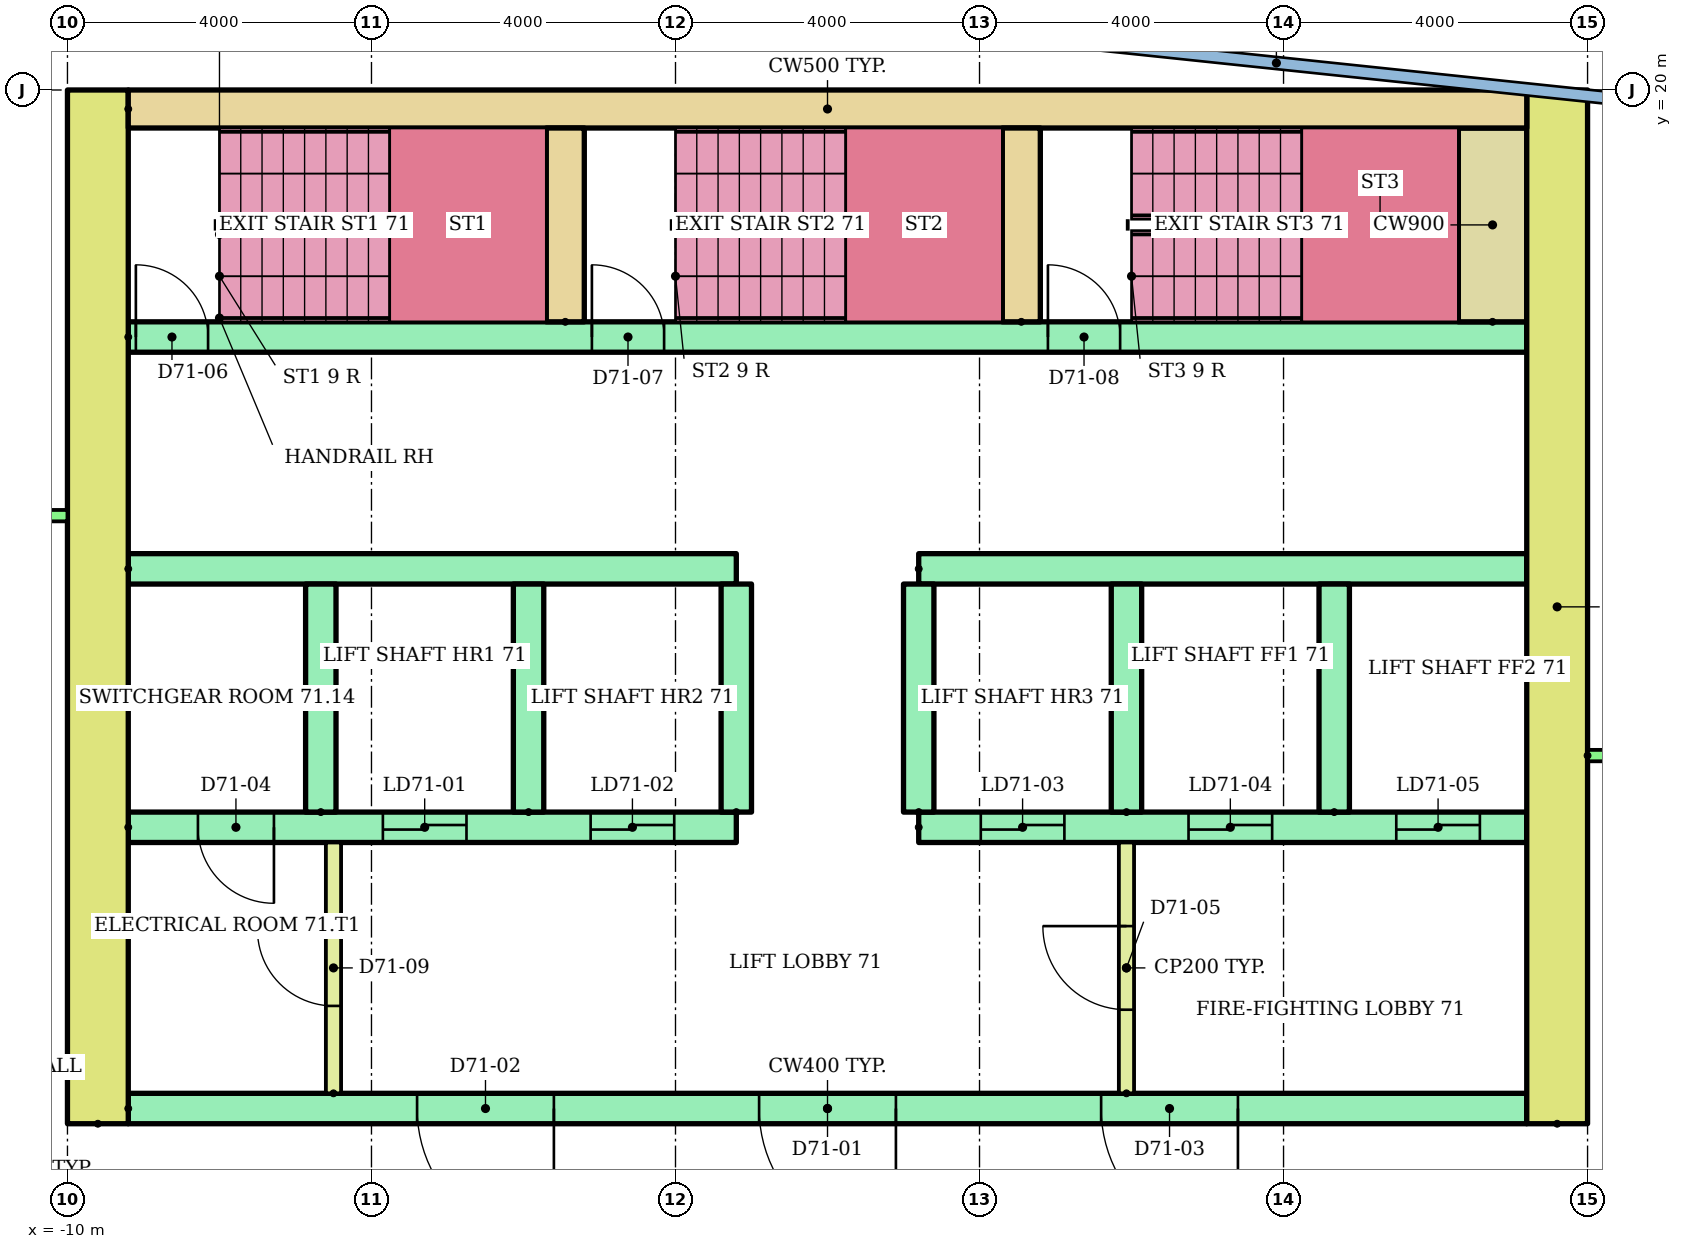
"""IFC4 building model, lengths in metres.
Left out: names, types, materials, properties, quantities, classifications, styles, units other than length and angle.
Written with IfcOpenShell. Run it as: python <this file> out.ifc"""

import sys

from ifc_helpers import new_model, si_unit, direction, frame, frame_2d, origin, place, context, subcontext, project, spatial, rectangle, extrude, element, fill, save


model = new_model("IFC4")
c1 = context("Model", 3, precision=1e-05, world=origin(), true_north=direction((0.0, 1.0)))
c2 = subcontext(c1, "Body", "Model", "MODEL_VIEW")
j1 = project(units=[si_unit("LENGTHUNIT", "METRE"), si_unit("PLANEANGLEUNIT", "RADIAN")], contexts=[c1])
p1 = place(None, origin())
s1 = spatial("IfcSite", under=j1, at=p1, CompositionType="ELEMENT")
p2 = place(p1, origin())
s2 = spatial("IfcBuilding", under=s1, at=p2, CompositionType="ELEMENT")
p3 = place(p2, frame((0.0, 0.0, 272.3)))
s3 = spatial("IfcBuildingStorey", under=s2, at=p3, CompositionType="ELEMENT", Elevation=272.3)
for number, where, z_axis, x_axis in (
    (1, (-9.6, 6.4, 0.0), (0.0, 0.0, 1.0), (0.0, 1.0, 0.0)),
    (2, (9.6, 6.4, 0.0), (0.0, 0.0, 1.0), (0.0, 1.0, 0.0)),
):
    element("IfcWall", number, at=place(p3, frame(where, z_axis=z_axis, x_axis=x_axis)), inside=s3, PredefinedType="SHEAR", context=c2, shape_type="SweptSolid", body=[
        extrude(rectangle(XDim=13.6, YDim=0.8, at=frame_2d((6.8, 0.0))), origin(), (0.0, 0.0, 1.0), 2.92),
    ])
p4 = place(p3, frame((-9.2, 19.75, 0.0)))
e3 = element("IfcWall", 3, at=p4, inside=s3, PredefinedType="SHEAR", context=c2, shape_type="SweptSolid", body=[
    extrude(rectangle(XDim=18.4, YDim=0.5, at=frame_2d((9.2, 0.0))), origin(), (0.0, 0.0, 1.0), 2.92),
])
p5 = place(p3, frame((-9.2, 6.6, 0.0)))
e4 = element("IfcWall", 4, at=p5, inside=s3, PredefinedType="SHEAR", context=c2, shape_type="SweptSolid", body=[
    extrude(rectangle(XDim=18.4, YDim=0.4, at=frame_2d((9.2, 0.0))), origin(), (0.0, 0.0, 1.0), 2.92),
])
p6 = place(p5, frame((8.3, 0.0, 0.0)))
e5 = element("IfcOpeningElement", 5, at=p6, cuts=e4, PredefinedType="OPENING", context=c2, shape_type="SweptSolid", body=[
    extrude(rectangle(XDim=1.8, YDim=2.1, at=frame_2d((0.9, 1.05))), frame((0.0, 0.21, 0.0), z_axis=(0.0, -1.0, 0.0), x_axis=(1.0, 0.0, 0.0)), (0.0, 0.0, 1.0), 0.42),
])
p7 = place(p5, frame((3.8, 0.0, 0.0)))
e6 = element("IfcOpeningElement", 6, at=p7, cuts=e4, PredefinedType="OPENING", context=c2, shape_type="SweptSolid", body=[
    extrude(rectangle(XDim=1.8, YDim=2.1, at=frame_2d((0.9, 1.05))), frame((0.0, 0.21, 0.0), z_axis=(0.0, -1.0, 0.0), x_axis=(1.0, 0.0, 0.0)), (0.0, 0.0, 1.0), 0.42),
])
p8 = place(p5, frame((12.8, 0.0, 0.0)))
e7 = element("IfcOpeningElement", 7, at=p8, cuts=e4, PredefinedType="OPENING", context=c2, shape_type="SweptSolid", body=[
    extrude(rectangle(XDim=1.8, YDim=2.1, at=frame_2d((0.9, 1.05))), frame((0.0, 0.21, 0.0), z_axis=(0.0, -1.0, 0.0), x_axis=(1.0, 0.0, 0.0)), (0.0, 0.0, 1.0), 0.42),
])
p9 = place(p3, frame((-9.2, 10.3, 0.0)))
e8 = element("IfcWall", 8, at=p9, inside=s3, PredefinedType="SHEAR", context=c2, shape_type="SweptSolid", body=[
    extrude(rectangle(XDim=8.0, YDim=0.4, at=frame_2d((4.0, 0.0))), origin(), (0.0, 0.0, 1.0), 2.92),
])
p10 = place(p9, frame((3.35, 0.0, 0.0)))
e9 = element("IfcOpeningElement", 9, at=p10, cuts=e8, PredefinedType="OPENING", context=c2, shape_type="SweptSolid", body=[
    extrude(rectangle(XDim=1.1, YDim=2.1, at=frame_2d((0.55, 1.05))), frame((0.0, 0.21, 0.0), z_axis=(0.0, -1.0, 0.0), x_axis=(1.0, 0.0, 0.0)), (0.0, 0.0, 1.0), 0.42),
])
p11 = place(p9, frame((6.083, 0.0, 0.0)))
e10 = element("IfcOpeningElement", 10, at=p11, cuts=e8, PredefinedType="OPENING", context=c2, shape_type="SweptSolid", body=[
    extrude(rectangle(XDim=1.1, YDim=2.1, at=frame_2d((0.55, 1.05))), frame((0.0, 0.21, 0.0), z_axis=(0.0, -1.0, 0.0), x_axis=(1.0, 0.0, 0.0)), (0.0, 0.0, 1.0), 0.42),
])
p12 = place(p9, frame((0.917, 0.0, 0.0)))
e11 = element("IfcOpeningElement", 11, at=p12, cuts=e8, PredefinedType="OPENING", context=c2, shape_type="SweptSolid", body=[
    extrude(rectangle(XDim=1.0, YDim=2.1, at=frame_2d((0.5, 1.05))), frame((0.0, 0.21, 0.0), z_axis=(0.0, -1.0, 0.0), x_axis=(1.0, 0.0, 0.0)), (0.0, 0.0, 1.0), 0.42),
])
p13 = place(p3, frame((-9.2, 13.7, 0.0)))
e12 = element("IfcWall", 12, at=p13, inside=s3, PredefinedType="SHEAR", context=c2, shape_type="SweptSolid", body=[
    extrude(rectangle(XDim=8.0, YDim=0.4, at=frame_2d((4.0, 0.0))), origin(), (0.0, 0.0, 1.0), 2.92),
])
p14 = place(p3, frame((1.2, 10.3, 0.0)))
e13 = element("IfcWall", 13, at=p14, inside=s3, PredefinedType="SHEAR", context=c2, shape_type="SweptSolid", body=[
    extrude(rectangle(XDim=8.0, YDim=0.4, at=frame_2d((4.0, 0.0))), origin(), (0.0, 0.0, 1.0), 2.92),
])
p15 = place(p14, frame((0.817, 0.0, 0.0)))
e14 = element("IfcOpeningElement", 14, at=p15, cuts=e13, PredefinedType="OPENING", context=c2, shape_type="SweptSolid", body=[
    extrude(rectangle(XDim=1.1, YDim=2.1, at=frame_2d((0.55, 1.05))), frame((0.0, 0.21, 0.0), z_axis=(0.0, -1.0, 0.0), x_axis=(1.0, 0.0, 0.0)), (0.0, 0.0, 1.0), 0.42),
])
p16 = place(p14, frame((3.55, 0.0, 0.0)))
e15 = element("IfcOpeningElement", 15, at=p16, cuts=e13, PredefinedType="OPENING", context=c2, shape_type="SweptSolid", body=[
    extrude(rectangle(XDim=1.1, YDim=2.1, at=frame_2d((0.55, 1.05))), frame((0.0, 0.21, 0.0), z_axis=(0.0, -1.0, 0.0), x_axis=(1.0, 0.0, 0.0)), (0.0, 0.0, 1.0), 0.42),
])
p17 = place(p14, frame((6.283, 0.0, 0.0)))
e16 = element("IfcOpeningElement", 16, at=p17, cuts=e13, PredefinedType="OPENING", context=c2, shape_type="SweptSolid", body=[
    extrude(rectangle(XDim=1.1, YDim=2.1, at=frame_2d((0.55, 1.05))), frame((0.0, 0.21, 0.0), z_axis=(0.0, -1.0, 0.0), x_axis=(1.0, 0.0, 0.0)), (0.0, 0.0, 1.0), 0.42),
])
p18 = place(p3, frame((1.2, 13.7, 0.0)))
e17 = element("IfcWall", 17, at=p18, inside=s3, PredefinedType="SHEAR", context=c2, shape_type="SweptSolid", body=[
    extrude(rectangle(XDim=8.0, YDim=0.4, at=frame_2d((4.0, 0.0))), origin(), (0.0, 0.0, 1.0), 2.92),
])
for number, where, z_axis, x_axis in (
    (18, (-6.667, 10.5, 0.0), (0.0, 0.0, 1.0), (0.0, 1.0, 0.0)),
    (19, (-3.933, 10.5, 0.0), (0.0, 0.0, 1.0), (0.0, 1.0, 0.0)),
    (20, (-1.2, 10.5, 0.0), (0.0, 0.0, 1.0), (0.0, 1.0, 0.0)),
    (21, (1.2, 10.5, 0.0), (0.0, 0.0, 1.0), (0.0, 1.0, 0.0)),
    (22, (3.933, 10.5, 0.0), (0.0, 0.0, 1.0), (0.0, 1.0, 0.0)),
    (23, (6.667, 10.5, 0.0), (0.0, 0.0, 1.0), (0.0, 1.0, 0.0)),
):
    element("IfcWall", number, at=place(p3, frame(where, z_axis=z_axis, x_axis=x_axis)), inside=s3, PredefinedType="SHEAR", context=c2, shape_type="SweptSolid", body=[
        extrude(rectangle(XDim=3.0, YDim=0.4, at=frame_2d((1.5, 0.0))), origin(), (0.0, 0.0, 1.0), 2.92),
    ])
p19 = place(p3, frame((3.933, 6.8, 0.0), z_axis=(0.0, 0.0, 1.0), x_axis=(0.0, 1.0, 0.0)))
e24 = element("IfcWall", 24, at=p19, inside=s3, PredefinedType="PARTITIONING", context=c2, shape_type="SweptSolid", body=[
    extrude(rectangle(XDim=3.3, YDim=0.2, at=frame_2d((1.65, 0.0))), origin(), (0.0, 0.0, 1.0), 2.92),
])
p20 = place(p19, frame((1.1, 0.0, 0.0)))
e25 = element("IfcOpeningElement", 25, at=p20, cuts=e24, PredefinedType="OPENING", context=c2, shape_type="SweptSolid", body=[
    extrude(rectangle(XDim=1.1, YDim=2.1, at=frame_2d((0.55, 1.05))), frame((0.0, 0.11, 0.0), z_axis=(0.0, -1.0, 0.0), x_axis=(1.0, 0.0, 0.0)), (0.0, 0.0, 1.0), 0.22),
])
p21 = place(p3, frame((-9.2, 16.75, 0.0)))
e26 = element("IfcWall", 26, at=p21, inside=s3, PredefinedType="SHEAR", context=c2, shape_type="SweptSolid", body=[
    extrude(rectangle(XDim=18.4, YDim=0.4, at=frame_2d((9.2, 0.0))), origin(), (0.0, 0.0, 1.0), 2.92),
])
p22 = place(p21, frame((0.1, 0.0, 0.0)))
e27 = element("IfcOpeningElement", 27, at=p22, cuts=e26, PredefinedType="OPENING", context=c2, shape_type="SweptSolid", body=[
    extrude(rectangle(XDim=0.95, YDim=2.1, at=frame_2d((0.475, 1.05))), frame((0.0, 0.21, 0.0), z_axis=(0.0, -1.0, 0.0), x_axis=(1.0, 0.0, 0.0)), (0.0, 0.0, 1.0), 0.42),
])
p23 = place(p21, frame((6.1, 0.0, 0.0)))
e28 = element("IfcOpeningElement", 28, at=p23, cuts=e26, PredefinedType="OPENING", context=c2, shape_type="SweptSolid", body=[
    extrude(rectangle(XDim=0.95, YDim=2.1, at=frame_2d((0.475, 1.05))), frame((0.0, 0.21, 0.0), z_axis=(0.0, -1.0, 0.0), x_axis=(1.0, 0.0, 0.0)), (0.0, 0.0, 1.0), 0.42),
])
p24 = place(p21, frame((12.1, 0.0, 0.0)))
e29 = element("IfcOpeningElement", 29, at=p24, cuts=e26, PredefinedType="OPENING", context=c2, shape_type="SweptSolid", body=[
    extrude(rectangle(XDim=0.95, YDim=2.1, at=frame_2d((0.475, 1.05))), frame((0.0, 0.21, 0.0), z_axis=(0.0, -1.0, 0.0), x_axis=(1.0, 0.0, 0.0)), (0.0, 0.0, 1.0), 0.42),
])
for number, where, z_axis, x_axis in (
    (30, (-3.45, 16.95, 0.0), (0.0, 0.0, 1.0), (0.0, 1.0, 0.0)),
    (31, (2.55, 16.95, 0.0), (0.0, 0.0, 1.0), (0.0, 1.0, 0.0)),
):
    element("IfcWall", number, at=place(p3, frame(where, z_axis=z_axis, x_axis=x_axis)), inside=s3, PredefinedType="SHEAR", context=c2, shape_type="SweptSolid", body=[
        extrude(rectangle(XDim=2.55, YDim=0.5, at=frame_2d((1.275, 0.0))), origin(), (0.0, 0.0, 1.0), 2.92),
    ])
p25 = place(p3, frame((8.75, 16.95, 0.0), z_axis=(0.0, 0.0, 1.0), x_axis=(0.0, 1.0, 0.0)))
e32 = element("IfcWall", 32, at=p25, inside=s3, PredefinedType="SHEAR", context=c2, shape_type="SweptSolid", body=[
    extrude(rectangle(XDim=2.55, YDim=0.9, at=frame_2d((1.275, 0.0))), origin(), (0.0, 0.0, 1.0), 2.92),
])
p26 = place(p3, frame((-6.5, 6.8, 0.0), z_axis=(0.0, 0.0, 1.0), x_axis=(0.0, 1.0, 0.0)))
e33 = element("IfcWall", 33, at=p26, inside=s3, PredefinedType="PARTITIONING", context=c2, shape_type="SweptSolid", body=[
    extrude(rectangle(XDim=3.3, YDim=0.2, at=frame_2d((1.65, 0.0))), origin(), (0.0, 0.0, 1.0), 2.92),
])
p27 = place(p26, frame((1.15, 0.0, 0.0)))
e34 = element("IfcOpeningElement", 34, at=p27, cuts=e33, PredefinedType="OPENING", context=c2, shape_type="SweptSolid", body=[
    extrude(rectangle(XDim=1.0, YDim=2.1, at=frame_2d((0.5, 1.05))), frame((0.0, 0.11, 0.0), z_axis=(0.0, -1.0, 0.0), x_axis=(1.0, 0.0, 0.0)), (0.0, 0.0, 1.0), 0.22),
])
p28 = place(p3, frame((-21.89, 14.4, 0.0)))
e35 = element("IfcWall", 35, at=p28, inside=s3, PredefinedType="PARTITIONING", context=c2, shape_type="SweptSolid", body=[
    extrude(rectangle(XDim=11.89, YDim=0.15, at=frame_2d((5.945, 0.0))), origin(), (0.0, 0.0, 1.0), 2.4),
])
p29 = place(p28, frame((1.26, 0.0, 0.0)))
e36 = element("IfcOpeningElement", 36, at=p29, cuts=e35, PredefinedType="OPENING", context=c2, shape_type="SweptSolid", body=[
    extrude(rectangle(XDim=1.0, YDim=2.1, at=frame_2d((0.5, 1.05))), frame((0.0, 0.085, 0.0), z_axis=(0.0, -1.0, 0.0), x_axis=(1.0, 0.0, 0.0)), (0.0, 0.0, 1.0), 0.17),
])
p30 = place(p28, frame((8.254, 0.0, 0.0)))
e37 = element("IfcOpeningElement", 37, at=p30, cuts=e35, PredefinedType="OPENING", context=c2, shape_type="SweptSolid", body=[
    extrude(rectangle(XDim=1.0, YDim=2.1, at=frame_2d((0.5, 1.05))), frame((0.0, 0.085, 0.0), z_axis=(0.0, -1.0, 0.0), x_axis=(1.0, 0.0, 0.0)), (0.0, 0.0, 1.0), 0.17),
])
p31 = place(p3, frame((10.0, 11.243, 0.0)))
e38 = element("IfcWall", 38, at=p31, inside=s3, PredefinedType="PARTITIONING", context=c2, shape_type="SweptSolid", body=[
    extrude(rectangle(XDim=22.118, YDim=0.15, at=frame_2d((11.059, 0.0))), origin(), (0.0, 0.0, 1.0), 2.4),
])
p32 = place(p31, frame((7.398, 0.0, 0.0)))
e39 = element("IfcOpeningElement", 39, at=p32, cuts=e38, PredefinedType="OPENING", context=c2, shape_type="SweptSolid", body=[
    extrude(rectangle(XDim=1.0, YDim=2.1, at=frame_2d((0.5, 1.05))), frame((0.0, 0.085, 0.0), z_axis=(0.0, -1.0, 0.0), x_axis=(1.0, 0.0, 0.0)), (0.0, 0.0, 1.0), 0.17),
])
p33 = place(p31, frame((18.477, 0.0, 0.0)))
e40 = element("IfcOpeningElement", 40, at=p33, cuts=e38, PredefinedType="OPENING", context=c2, shape_type="SweptSolid", body=[
    extrude(rectangle(XDim=0.9, YDim=2.1, at=frame_2d((0.45, 1.05))), frame((0.0, 0.085, 0.0), z_axis=(0.0, -1.0, 0.0), x_axis=(1.0, 0.0, 0.0)), (0.0, 0.0, 1.0), 0.17),
])
p34 = place(p6, frame((1.8, 0.0, 0.0), z_axis=(0.0, 0.0, 1.0), x_axis=(-1.0, 0.0, 0.0)))
e41 = element("IfcDoor", 41, at=p34, inside=s3, OperationType="DOUBLE_DOOR_SINGLE_SWING", PredefinedType="DOOR", context=c2, shape_type="SweptSolid", body=[
    extrude(rectangle(XDim=1.8, YDim=2.1, at=frame_2d((0.9, 1.05))), frame((0.0, 0.025, 0.0), z_axis=(0.0, -1.0, 0.0), x_axis=(1.0, 0.0, 0.0)), (0.0, 0.0, 1.0), 0.05),
])
fill(e5, e41)
p35 = place(p7, frame((1.8, 0.0, 0.0), z_axis=(0.0, 0.0, 1.0), x_axis=(-1.0, 0.0, 0.0)))
e42 = element("IfcDoor", 42, at=p35, inside=s3, OperationType="DOUBLE_DOOR_SINGLE_SWING", PredefinedType="DOOR", context=c2, shape_type="SweptSolid", body=[
    extrude(rectangle(XDim=1.8, YDim=2.1, at=frame_2d((0.9, 1.05))), frame((0.0, 0.025, 0.0), z_axis=(0.0, -1.0, 0.0), x_axis=(1.0, 0.0, 0.0)), (0.0, 0.0, 1.0), 0.05),
])
fill(e6, e42)
p36 = place(p8, frame((1.8, 0.0, 0.0), z_axis=(0.0, 0.0, 1.0), x_axis=(-1.0, 0.0, 0.0)))
e43 = element("IfcDoor", 43, at=p36, inside=s3, OperationType="DOUBLE_DOOR_SINGLE_SWING", PredefinedType="DOOR", context=c2, shape_type="SweptSolid", body=[
    extrude(rectangle(XDim=1.8, YDim=2.1, at=frame_2d((0.9, 1.05))), frame((0.0, 0.025, 0.0), z_axis=(0.0, -1.0, 0.0), x_axis=(1.0, 0.0, 0.0)), (0.0, 0.0, 1.0), 0.05),
])
fill(e7, e43)
p37 = place(p10, origin())
e44 = element("IfcDoor", 44, at=p37, inside=s3, OperationType="SLIDING_TO_LEFT", PredefinedType="DOOR", context=c2, shape_type="SweptSolid", body=[
    extrude(rectangle(XDim=1.1, YDim=2.1, at=frame_2d((0.55, 1.05))), frame((0.0, 0.025, 0.0), z_axis=(0.0, -1.0, 0.0), x_axis=(1.0, 0.0, 0.0)), (0.0, 0.0, 1.0), 0.05),
])
fill(e9, e44)
p38 = place(p11, origin())
e45 = element("IfcDoor", 45, at=p38, inside=s3, OperationType="SLIDING_TO_LEFT", PredefinedType="DOOR", context=c2, shape_type="SweptSolid", body=[
    extrude(rectangle(XDim=1.1, YDim=2.1, at=frame_2d((0.55, 1.05))), frame((0.0, 0.025, 0.0), z_axis=(0.0, -1.0, 0.0), x_axis=(1.0, 0.0, 0.0)), (0.0, 0.0, 1.0), 0.05),
])
fill(e10, e45)
p39 = place(p15, origin())
e46 = element("IfcDoor", 46, at=p39, inside=s3, OperationType="SLIDING_TO_LEFT", PredefinedType="DOOR", context=c2, shape_type="SweptSolid", body=[
    extrude(rectangle(XDim=1.1, YDim=2.1, at=frame_2d((0.55, 1.05))), frame((0.0, 0.025, 0.0), z_axis=(0.0, -1.0, 0.0), x_axis=(1.0, 0.0, 0.0)), (0.0, 0.0, 1.0), 0.05),
])
fill(e14, e46)
p40 = place(p16, origin())
e47 = element("IfcDoor", 47, at=p40, inside=s3, OperationType="SLIDING_TO_LEFT", PredefinedType="DOOR", context=c2, shape_type="SweptSolid", body=[
    extrude(rectangle(XDim=1.1, YDim=2.1, at=frame_2d((0.55, 1.05))), frame((0.0, 0.025, 0.0), z_axis=(0.0, -1.0, 0.0), x_axis=(1.0, 0.0, 0.0)), (0.0, 0.0, 1.0), 0.05),
])
fill(e15, e47)
p41 = place(p17, origin())
e48 = element("IfcDoor", 48, at=p41, inside=s3, OperationType="SLIDING_TO_LEFT", PredefinedType="DOOR", context=c2, shape_type="SweptSolid", body=[
    extrude(rectangle(XDim=1.1, YDim=2.1, at=frame_2d((0.55, 1.05))), frame((0.0, 0.025, 0.0), z_axis=(0.0, -1.0, 0.0), x_axis=(1.0, 0.0, 0.0)), (0.0, 0.0, 1.0), 0.05),
])
fill(e16, e48)
p42 = place(p12, frame((1.0, 0.0, 0.0), z_axis=(0.0, 0.0, 1.0), x_axis=(-1.0, 0.0, 0.0)))
e49 = element("IfcDoor", 49, at=p42, inside=s3, OperationType="SINGLE_SWING_RIGHT", PredefinedType="DOOR", context=c2, shape_type="SweptSolid", body=[
    extrude(rectangle(XDim=1.0, YDim=2.1, at=frame_2d((0.5, 1.05))), frame((0.0, 0.025, 0.0), z_axis=(0.0, -1.0, 0.0), x_axis=(1.0, 0.0, 0.0)), (0.0, 0.0, 1.0), 0.05),
])
fill(e11, e49)
p43 = place(p20, origin())
e50 = element("IfcDoor", 50, at=p43, inside=s3, OperationType="SINGLE_SWING_RIGHT", PredefinedType="DOOR", context=c2, shape_type="SweptSolid", body=[
    extrude(rectangle(XDim=1.1, YDim=2.1, at=frame_2d((0.55, 1.05))), frame((0.0, 0.025, 0.0), z_axis=(0.0, -1.0, 0.0), x_axis=(1.0, 0.0, 0.0)), (0.0, 0.0, 1.0), 0.05),
])
fill(e25, e50)
p44 = place(p22, origin())
e51 = element("IfcDoor", 51, at=p44, inside=s3, OperationType="SINGLE_SWING_LEFT", PredefinedType="DOOR", context=c2, shape_type="SweptSolid", body=[
    extrude(rectangle(XDim=0.95, YDim=2.1, at=frame_2d((0.475, 1.05))), frame((0.0, 0.025, 0.0), z_axis=(0.0, -1.0, 0.0), x_axis=(1.0, 0.0, 0.0)), (0.0, 0.0, 1.0), 0.05),
])
fill(e27, e51)
p45 = place(p23, origin())
e52 = element("IfcDoor", 52, at=p45, inside=s3, OperationType="SINGLE_SWING_LEFT", PredefinedType="DOOR", context=c2, shape_type="SweptSolid", body=[
    extrude(rectangle(XDim=0.95, YDim=2.1, at=frame_2d((0.475, 1.05))), frame((0.0, 0.025, 0.0), z_axis=(0.0, -1.0, 0.0), x_axis=(1.0, 0.0, 0.0)), (0.0, 0.0, 1.0), 0.05),
])
fill(e28, e52)
p46 = place(p24, origin())
e53 = element("IfcDoor", 53, at=p46, inside=s3, OperationType="SINGLE_SWING_LEFT", PredefinedType="DOOR", context=c2, shape_type="SweptSolid", body=[
    extrude(rectangle(XDim=0.95, YDim=2.1, at=frame_2d((0.475, 1.05))), frame((0.0, 0.025, 0.0), z_axis=(0.0, -1.0, 0.0), x_axis=(1.0, 0.0, 0.0)), (0.0, 0.0, 1.0), 0.05),
])
fill(e29, e53)
p47 = place(p27, origin())
e54 = element("IfcDoor", 54, at=p47, inside=s3, OperationType="SINGLE_SWING_RIGHT", PredefinedType="DOOR", context=c2, shape_type="SweptSolid", body=[
    extrude(rectangle(XDim=1.0, YDim=2.1, at=frame_2d((0.5, 1.05))), frame((0.0, 0.025, 0.0), z_axis=(0.0, -1.0, 0.0), x_axis=(1.0, 0.0, 0.0)), (0.0, 0.0, 1.0), 0.05),
])
fill(e34, e54)
save(model, sys.argv[1])
